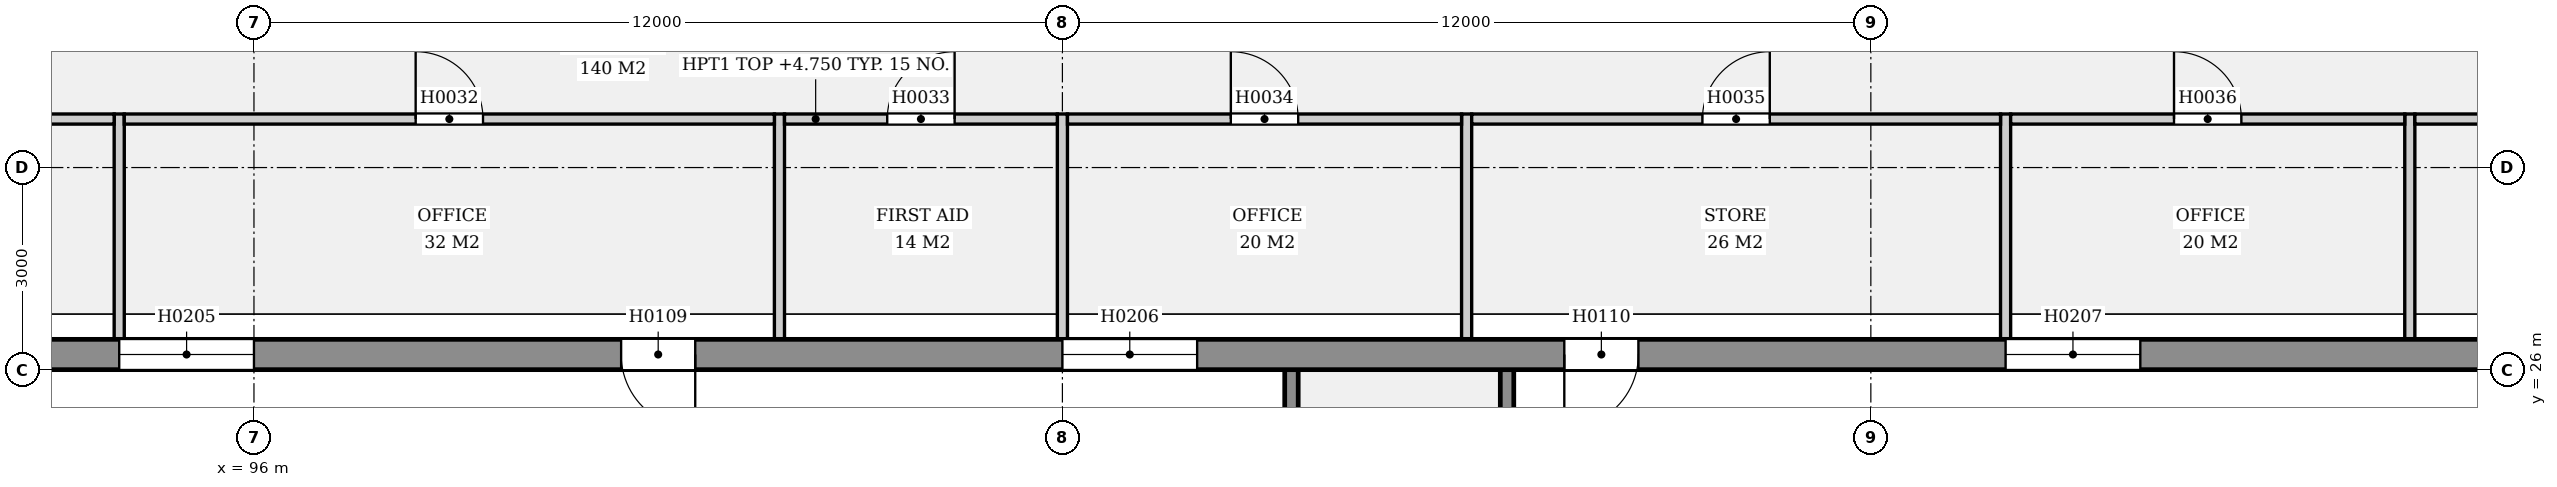
"""IFC4 building model, lengths in metres.
Left out: names, types, materials, properties, quantities, classifications, styles, units other than length and angle.
Written with IfcOpenShell. Run it as: python <this file> out.ifc"""

import sys

from ifc_helpers import new_model, si_unit, direction, frame, frame_2d, origin, place, context, subcontext, project, spatial, rectangle, extrude, element, fill, save


model = new_model("IFC4")
c1 = context("Model", 3, precision=1e-05, world=origin(), true_north=direction((0.0, 1.0)))
c2 = subcontext(c1, "Body", "Model", "MODEL_VIEW")
j1 = project(units=[si_unit("LENGTHUNIT", "METRE"), si_unit("PLANEANGLEUNIT", "RADIAN")], contexts=[c1])
p1 = place(None, origin())
s1 = spatial("IfcSite", under=j1, at=p1, CompositionType="ELEMENT")
p2 = place(p1, origin())
s2 = spatial("IfcBuilding", under=s1, at=p2, CompositionType="ELEMENT")
p3 = place(p2, origin())
s3 = spatial("IfcBuildingStorey", under=s2, at=p3, CompositionType="ELEMENT", Elevation=0.0)
p4 = place(p3, frame((64.0, 26.225, 0.0), z_axis=(0.0, 0.0, 1.0), x_axis=(1.0, 0.0, 0.0)))
e1 = element("IfcWall", 1, at=p4, inside=s3, PredefinedType="ELEMENTEDWALL", context=c2, shape_type="SweptSolid", body=[
    extrude(rectangle(XDim=76.0, YDim=0.45, at=frame_2d((38.0, 0.0))), origin(), (0.0, 0.0, 1.0), 5.0),
])
p5 = place(p4, frame((10.55, 0.0, 0.0), z_axis=(0.0, 0.0, 1.0), x_axis=(-1.0, 0.0, 0.0)))
e2 = element("IfcOpeningElement", 2, at=p5, cuts=e1, PredefinedType="OPENING", context=c2, shape_type="SweptSolid", body=[
    extrude(rectangle(XDim=1.1, YDim=2.2, at=frame_2d((0.55, 1.1))), frame((0.0, 0.235, 0.0), z_axis=(0.0, -1.0, 0.0), x_axis=(1.0, 0.0, 0.0)), (0.0, 0.0, 1.0), 0.47),
])
p6 = place(p4, frame((24.55, 0.0, 0.0), z_axis=(0.0, 0.0, 1.0), x_axis=(-1.0, 0.0, 0.0)))
e3 = element("IfcOpeningElement", 3, at=p6, cuts=e1, PredefinedType="OPENING", context=c2, shape_type="SweptSolid", body=[
    extrude(rectangle(XDim=1.1, YDim=2.2, at=frame_2d((0.55, 1.1))), frame((0.0, 0.235, 0.0), z_axis=(0.0, -1.0, 0.0), x_axis=(1.0, 0.0, 0.0)), (0.0, 0.0, 1.0), 0.47),
])
p7 = place(p4, frame((38.55, 0.0, 0.0), z_axis=(0.0, 0.0, 1.0), x_axis=(-1.0, 0.0, 0.0)))
e4 = element("IfcOpeningElement", 4, at=p7, cuts=e1, PredefinedType="OPENING", context=c2, shape_type="SweptSolid", body=[
    extrude(rectangle(XDim=1.1, YDim=2.2, at=frame_2d((0.55, 1.1))), frame((0.0, 0.235, 0.0), z_axis=(0.0, -1.0, 0.0), x_axis=(1.0, 0.0, 0.0)), (0.0, 0.0, 1.0), 0.47),
])
p8 = place(p4, frame((52.55, 0.0, 0.0), z_axis=(0.0, 0.0, 1.0), x_axis=(-1.0, 0.0, 0.0)))
e5 = element("IfcOpeningElement", 5, at=p8, cuts=e1, PredefinedType="OPENING", context=c2, shape_type="SweptSolid", body=[
    extrude(rectangle(XDim=1.1, YDim=2.2, at=frame_2d((0.55, 1.1))), frame((0.0, 0.235, 0.0), z_axis=(0.0, -1.0, 0.0), x_axis=(1.0, 0.0, 0.0)), (0.0, 0.0, 1.0), 0.47),
])
p9 = place(p4, frame((66.55, 0.0, 0.0), z_axis=(0.0, 0.0, 1.0), x_axis=(-1.0, 0.0, 0.0)))
e6 = element("IfcOpeningElement", 6, at=p9, cuts=e1, PredefinedType="OPENING", context=c2, shape_type="SweptSolid", body=[
    extrude(rectangle(XDim=1.1, YDim=2.2, at=frame_2d((0.55, 1.1))), frame((0.0, 0.235, 0.0), z_axis=(0.0, -1.0, 0.0), x_axis=(1.0, 0.0, 0.0)), (0.0, 0.0, 1.0), 0.47),
])
p10 = place(p4, frame((16.0, 0.0, 3.2)))
e7 = element("IfcOpeningElement", 7, at=p10, cuts=e1, PredefinedType="OPENING", context=c2, shape_type="SweptSolid", body=[
    extrude(rectangle(XDim=2.0, YDim=1.0, at=frame_2d((1.0, 0.5))), frame((0.0, 0.235, 0.0), z_axis=(0.0, -1.0, 0.0), x_axis=(1.0, 0.0, 0.0)), (0.0, 0.0, 1.0), 0.47),
])
p11 = place(p4, frame((30.0, 0.0, 3.2)))
e8 = element("IfcOpeningElement", 8, at=p11, cuts=e1, PredefinedType="OPENING", context=c2, shape_type="SweptSolid", body=[
    extrude(rectangle(XDim=2.0, YDim=1.0, at=frame_2d((1.0, 0.5))), frame((0.0, 0.235, 0.0), z_axis=(0.0, -1.0, 0.0), x_axis=(1.0, 0.0, 0.0)), (0.0, 0.0, 1.0), 0.47),
])
p12 = place(p4, frame((44.0, 0.0, 3.2)))
e9 = element("IfcOpeningElement", 9, at=p12, cuts=e1, PredefinedType="OPENING", context=c2, shape_type="SweptSolid", body=[
    extrude(rectangle(XDim=2.0, YDim=1.0, at=frame_2d((1.0, 0.5))), frame((0.0, 0.235, 0.0), z_axis=(0.0, -1.0, 0.0), x_axis=(1.0, 0.0, 0.0)), (0.0, 0.0, 1.0), 0.47),
])
p13 = place(p4, frame((58.0, 0.0, 3.2)))
e10 = element("IfcOpeningElement", 10, at=p13, cuts=e1, PredefinedType="OPENING", context=c2, shape_type="SweptSolid", body=[
    extrude(rectangle(XDim=2.0, YDim=1.0, at=frame_2d((1.0, 0.5))), frame((0.0, 0.235, 0.0), z_axis=(0.0, -1.0, 0.0), x_axis=(1.0, 0.0, 0.0)), (0.0, 0.0, 1.0), 0.47),
])
p14 = place(p3, frame((111.4, 19.15, 0.0), z_axis=(0.0, 0.0, 1.0), x_axis=(0.0, 1.0, 0.0)))
e11 = element("IfcWall", 11, at=p14, inside=s3, PredefinedType="ELEMENTEDWALL", context=c2, shape_type="SweptSolid", body=[
    extrude(rectangle(XDim=6.85, YDim=0.2, at=frame_2d((3.425, 0.0))), origin(), (0.0, 0.0, 1.0), 3.2),
])
p15 = place(p14, frame((0.913, 0.0, 0.9)))
e12 = element("IfcOpeningElement", 12, at=p15, cuts=e11, PredefinedType="OPENING", context=c2, shape_type="SweptSolid", body=[
    extrude(rectangle(XDim=1.6, YDim=1.6, at=frame_2d((0.8, 0.8))), frame((0.0, 0.11, 0.0), z_axis=(0.0, -1.0, 0.0), x_axis=(1.0, 0.0, 0.0)), (0.0, 0.0, 1.0), 0.22),
])
p16 = place(p14, frame((4.337, 0.0, 0.9)))
e13 = element("IfcOpeningElement", 13, at=p16, cuts=e11, PredefinedType="OPENING", context=c2, shape_type="SweptSolid", body=[
    extrude(rectangle(XDim=1.6, YDim=1.6, at=frame_2d((0.8, 0.8))), frame((0.0, 0.11, 0.0), z_axis=(0.0, -1.0, 0.0), x_axis=(1.0, 0.0, 0.0)), (0.0, 0.0, 1.0), 0.22),
])
p17 = place(p3, frame((114.6, 19.15, 0.0), z_axis=(0.0, 0.0, 1.0), x_axis=(0.0, 1.0, 0.0)))
e14 = element("IfcWall", 14, at=p17, inside=s3, PredefinedType="ELEMENTEDWALL", context=c2, shape_type="SweptSolid", body=[
    extrude(rectangle(XDim=6.85, YDim=0.2, at=frame_2d((3.425, 0.0))), origin(), (0.0, 0.0, 1.0), 3.2),
])
p18 = place(p17, frame((0.913, 0.0, 0.9)))
e15 = element("IfcOpeningElement", 15, at=p18, cuts=e14, PredefinedType="OPENING", context=c2, shape_type="SweptSolid", body=[
    extrude(rectangle(XDim=1.6, YDim=1.6, at=frame_2d((0.8, 0.8))), frame((0.0, 0.11, 0.0), z_axis=(0.0, -1.0, 0.0), x_axis=(1.0, 0.0, 0.0)), (0.0, 0.0, 1.0), 0.22),
])
p19 = place(p17, frame((4.337, 0.0, 0.9)))
e16 = element("IfcOpeningElement", 16, at=p19, cuts=e14, PredefinedType="OPENING", context=c2, shape_type="SweptSolid", body=[
    extrude(rectangle(XDim=1.6, YDim=1.6, at=frame_2d((0.8, 0.8))), frame((0.0, 0.11, 0.0), z_axis=(0.0, -1.0, 0.0), x_axis=(1.0, 0.0, 0.0)), (0.0, 0.0, 1.0), 0.22),
])
p20 = place(p3, frame((84.075, 29.72, 0.0), z_axis=(0.0, 0.0, 1.0), x_axis=(1.0, 0.0, 0.0)))
e17 = element("IfcWall", 17, at=p20, inside=s3, PredefinedType="PARTITIONING", context=c2, shape_type="SweptSolid", body=[
    extrude(rectangle(XDim=9.85, YDim=0.15, at=frame_2d((4.925, 0.0))), origin(), (0.0, 0.0, 1.0), 4.75),
])
p21 = place(p20, frame((4.375, 0.0, 0.0)))
e18 = element("IfcOpeningElement", 18, at=p21, cuts=e17, PredefinedType="OPENING", context=c2, shape_type="SweptSolid", body=[
    extrude(rectangle(XDim=1.1, YDim=2.1, at=frame_2d((0.55, 1.05))), frame((0.0, 0.085, 0.0), z_axis=(0.0, -1.0, 0.0), x_axis=(1.0, 0.0, 0.0)), (0.0, 0.0, 1.0), 0.17),
])
p22 = place(p3, frame((94.0, 26.45, 0.0), z_axis=(0.0, 0.0, 1.0), x_axis=(0.0, 1.0, 0.0)))
e19 = element("IfcWall", 19, at=p22, inside=s3, PredefinedType="PARTITIONING", context=c2, shape_type="SweptSolid", body=[
    extrude(rectangle(XDim=3.345, YDim=0.15, at=frame_2d((1.672, 0.0))), origin(), (0.0, 0.0, 1.0), 4.75),
])
p23 = place(p3, frame((94.075, 29.72, 0.0), z_axis=(0.0, 0.0, 1.0), x_axis=(1.0, 0.0, 0.0)))
e20 = element("IfcWall", 20, at=p23, inside=s3, PredefinedType="PARTITIONING", context=c2, shape_type="SweptSolid", body=[
    extrude(rectangle(XDim=9.65, YDim=0.15, at=frame_2d((4.825, 0.0))), origin(), (0.0, 0.0, 1.0), 4.75),
])
p24 = place(p23, frame((4.325, 0.0, 0.0)))
e21 = element("IfcOpeningElement", 21, at=p24, cuts=e20, PredefinedType="OPENING", context=c2, shape_type="SweptSolid", body=[
    extrude(rectangle(XDim=1.0, YDim=2.1, at=frame_2d((0.5, 1.05))), frame((0.0, 0.085, 0.0), z_axis=(0.0, -1.0, 0.0), x_axis=(1.0, 0.0, 0.0)), (0.0, 0.0, 1.0), 0.17),
])
p25 = place(p3, frame((103.8, 26.45, 0.0), z_axis=(0.0, 0.0, 1.0), x_axis=(0.0, 1.0, 0.0)))
e22 = element("IfcWall", 22, at=p25, inside=s3, PredefinedType="PARTITIONING", context=c2, shape_type="SweptSolid", body=[
    extrude(rectangle(XDim=3.345, YDim=0.15, at=frame_2d((1.672, 0.0))), origin(), (0.0, 0.0, 1.0), 4.75),
])
p26 = place(p3, frame((103.875, 29.72, 0.0), z_axis=(0.0, 0.0, 1.0), x_axis=(1.0, 0.0, 0.0)))
e23 = element("IfcWall", 23, at=p26, inside=s3, PredefinedType="PARTITIONING", context=c2, shape_type="SweptSolid", body=[
    extrude(rectangle(XDim=4.05, YDim=0.15, at=frame_2d((2.025, 0.0))), origin(), (0.0, 0.0, 1.0), 4.75),
])
p27 = place(p26, frame((1.525, 0.0, 0.0)))
e24 = element("IfcOpeningElement", 24, at=p27, cuts=e23, PredefinedType="OPENING", context=c2, shape_type="SweptSolid", body=[
    extrude(rectangle(XDim=1.0, YDim=2.1, at=frame_2d((0.5, 1.05))), frame((0.0, 0.085, 0.0), z_axis=(0.0, -1.0, 0.0), x_axis=(1.0, 0.0, 0.0)), (0.0, 0.0, 1.0), 0.17),
])
p28 = place(p3, frame((108.0, 26.45, 0.0), z_axis=(0.0, 0.0, 1.0), x_axis=(0.0, 1.0, 0.0)))
e25 = element("IfcWall", 25, at=p28, inside=s3, PredefinedType="PARTITIONING", context=c2, shape_type="SweptSolid", body=[
    extrude(rectangle(XDim=3.345, YDim=0.15, at=frame_2d((1.672, 0.0))), origin(), (0.0, 0.0, 1.0), 4.75),
])
p29 = place(p3, frame((108.075, 29.72, 0.0), z_axis=(0.0, 0.0, 1.0), x_axis=(1.0, 0.0, 0.0)))
e26 = element("IfcWall", 26, at=p29, inside=s3, PredefinedType="PARTITIONING", context=c2, shape_type="SweptSolid", body=[
    extrude(rectangle(XDim=5.85, YDim=0.15, at=frame_2d((2.925, 0.0))), origin(), (0.0, 0.0, 1.0), 4.75),
])
p30 = place(p29, frame((2.425, 0.0, 0.0)))
e27 = element("IfcOpeningElement", 27, at=p30, cuts=e26, PredefinedType="OPENING", context=c2, shape_type="SweptSolid", body=[
    extrude(rectangle(XDim=1.0, YDim=2.1, at=frame_2d((0.5, 1.05))), frame((0.0, 0.085, 0.0), z_axis=(0.0, -1.0, 0.0), x_axis=(1.0, 0.0, 0.0)), (0.0, 0.0, 1.0), 0.17),
])
p31 = place(p3, frame((114.0, 26.45, 0.0), z_axis=(0.0, 0.0, 1.0), x_axis=(0.0, 1.0, 0.0)))
e28 = element("IfcWall", 28, at=p31, inside=s3, PredefinedType="PARTITIONING", context=c2, shape_type="SweptSolid", body=[
    extrude(rectangle(XDim=3.345, YDim=0.15, at=frame_2d((1.672, 0.0))), origin(), (0.0, 0.0, 1.0), 4.75),
])
p32 = place(p3, frame((114.075, 29.72, 0.0), z_axis=(0.0, 0.0, 1.0), x_axis=(1.0, 0.0, 0.0)))
e29 = element("IfcWall", 29, at=p32, inside=s3, PredefinedType="PARTITIONING", context=c2, shape_type="SweptSolid", body=[
    extrude(rectangle(XDim=7.85, YDim=0.15, at=frame_2d((3.925, 0.0))), origin(), (0.0, 0.0, 1.0), 4.75),
])
p33 = place(p32, frame((3.425, 0.0, 0.0)))
e30 = element("IfcOpeningElement", 30, at=p33, cuts=e29, PredefinedType="OPENING", context=c2, shape_type="SweptSolid", body=[
    extrude(rectangle(XDim=1.0, YDim=2.1, at=frame_2d((0.5, 1.05))), frame((0.0, 0.085, 0.0), z_axis=(0.0, -1.0, 0.0), x_axis=(1.0, 0.0, 0.0)), (0.0, 0.0, 1.0), 0.17),
])
p34 = place(p3, frame((122.0, 26.45, 0.0), z_axis=(0.0, 0.0, 1.0), x_axis=(0.0, 1.0, 0.0)))
e31 = element("IfcWall", 31, at=p34, inside=s3, PredefinedType="PARTITIONING", context=c2, shape_type="SweptSolid", body=[
    extrude(rectangle(XDim=3.345, YDim=0.15, at=frame_2d((1.672, 0.0))), origin(), (0.0, 0.0, 1.0), 4.75),
])
p35 = place(p3, frame((122.075, 29.72, 0.0), z_axis=(0.0, 0.0, 1.0), x_axis=(1.0, 0.0, 0.0)))
e32 = element("IfcWall", 32, at=p35, inside=s3, PredefinedType="PARTITIONING", context=c2, shape_type="SweptSolid", body=[
    extrude(rectangle(XDim=5.85, YDim=0.15, at=frame_2d((2.925, 0.0))), origin(), (0.0, 0.0, 1.0), 4.75),
])
p36 = place(p35, frame((2.425, 0.0, 0.0)))
e33 = element("IfcOpeningElement", 33, at=p36, cuts=e32, PredefinedType="OPENING", context=c2, shape_type="SweptSolid", body=[
    extrude(rectangle(XDim=1.0, YDim=2.1, at=frame_2d((0.5, 1.05))), frame((0.0, 0.085, 0.0), z_axis=(0.0, -1.0, 0.0), x_axis=(1.0, 0.0, 0.0)), (0.0, 0.0, 1.0), 0.17),
])
p37 = place(p3, frame((128.0, 26.45, 0.0), z_axis=(0.0, 0.0, 1.0), x_axis=(0.0, 1.0, 0.0)))
e34 = element("IfcWall", 34, at=p37, inside=s3, PredefinedType="PARTITIONING", context=c2, shape_type="SweptSolid", body=[
    extrude(rectangle(XDim=3.345, YDim=0.15, at=frame_2d((1.672, 0.0))), origin(), (0.0, 0.0, 1.0), 4.75),
])
p38 = place(p3, frame((128.075, 29.72, 0.0), z_axis=(0.0, 0.0, 1.0), x_axis=(1.0, 0.0, 0.0)))
e35 = element("IfcWall", 35, at=p38, inside=s3, PredefinedType="PARTITIONING", context=c2, shape_type="SweptSolid", body=[
    extrude(rectangle(XDim=11.925, YDim=0.15, at=frame_2d((5.962, 0.0))), origin(), (0.0, 0.0, 1.0), 4.75),
])
p39 = place(p38, frame((5.425, 0.0, 0.0)))
e36 = element("IfcOpeningElement", 36, at=p39, cuts=e35, PredefinedType="OPENING", context=c2, shape_type="SweptSolid", body=[
    extrude(rectangle(XDim=1.0, YDim=2.1, at=frame_2d((0.5, 1.05))), frame((0.0, 0.085, 0.0), z_axis=(0.0, -1.0, 0.0), x_axis=(1.0, 0.0, 0.0)), (0.0, 0.0, 1.0), 0.17),
])
p40 = place(p7, origin())
e37 = element("IfcDoor", 37, at=p40, inside=s3, OperationType="SINGLE_SWING_RIGHT", PredefinedType="DOOR", context=c2, shape_type="SweptSolid", body=[
    extrude(rectangle(XDim=1.1, YDim=2.2, at=frame_2d((0.55, 1.1))), frame((0.0, 0.025, 0.0), z_axis=(0.0, -1.0, 0.0), x_axis=(1.0, 0.0, 0.0)), (0.0, 0.0, 1.0), 0.05),
])
fill(e4, e37)
p41 = place(p8, origin())
e38 = element("IfcDoor", 38, at=p41, inside=s3, OperationType="SINGLE_SWING_LEFT", PredefinedType="DOOR", context=c2, shape_type="SweptSolid", body=[
    extrude(rectangle(XDim=1.1, YDim=2.2, at=frame_2d((0.55, 1.1))), frame((0.0, 0.025, 0.0), z_axis=(0.0, -1.0, 0.0), x_axis=(1.0, 0.0, 0.0)), (0.0, 0.0, 1.0), 0.05),
])
fill(e5, e38)
p42 = place(p11, origin())
e39 = element("IfcWindow", 39, at=p42, inside=s3, PartitioningType="SINGLE_PANEL", PredefinedType="WINDOW", context=c2, shape_type="SweptSolid", body=[
    extrude(rectangle(XDim=2.0, YDim=1.0, at=frame_2d((1.0, 0.5))), frame((0.0, 0.03, 0.0), z_axis=(0.0, -1.0, 0.0), x_axis=(1.0, 0.0, 0.0)), (0.0, 0.0, 1.0), 0.06),
])
fill(e8, e39)
p43 = place(p12, origin())
e40 = element("IfcWindow", 40, at=p43, inside=s3, PartitioningType="SINGLE_PANEL", PredefinedType="WINDOW", context=c2, shape_type="SweptSolid", body=[
    extrude(rectangle(XDim=2.0, YDim=1.0, at=frame_2d((1.0, 0.5))), frame((0.0, 0.03, 0.0), z_axis=(0.0, -1.0, 0.0), x_axis=(1.0, 0.0, 0.0)), (0.0, 0.0, 1.0), 0.06),
])
fill(e9, e40)
p44 = place(p13, origin())
e41 = element("IfcWindow", 41, at=p44, inside=s3, PartitioningType="SINGLE_PANEL", PredefinedType="WINDOW", context=c2, shape_type="SweptSolid", body=[
    extrude(rectangle(XDim=2.0, YDim=1.0, at=frame_2d((1.0, 0.5))), frame((0.0, 0.03, 0.0), z_axis=(0.0, -1.0, 0.0), x_axis=(1.0, 0.0, 0.0)), (0.0, 0.0, 1.0), 0.06),
])
fill(e10, e41)
p45 = place(p24, origin())
e42 = element("IfcDoor", 42, at=p45, inside=s3, OperationType="SINGLE_SWING_LEFT", PredefinedType="DOOR", context=c2, shape_type="SweptSolid", body=[
    extrude(rectangle(XDim=1.0, YDim=2.1, at=frame_2d((0.5, 1.05))), frame((0.0, 0.025, 0.0), z_axis=(0.0, -1.0, 0.0), x_axis=(1.0, 0.0, 0.0)), (0.0, 0.0, 1.0), 0.05),
])
fill(e21, e42)
p46 = place(p27, origin())
e43 = element("IfcDoor", 43, at=p46, inside=s3, OperationType="SINGLE_SWING_RIGHT", PredefinedType="DOOR", context=c2, shape_type="SweptSolid", body=[
    extrude(rectangle(XDim=1.0, YDim=2.1, at=frame_2d((0.5, 1.05))), frame((0.0, 0.025, 0.0), z_axis=(0.0, -1.0, 0.0), x_axis=(1.0, 0.0, 0.0)), (0.0, 0.0, 1.0), 0.05),
])
fill(e24, e43)
p47 = place(p30, origin())
e44 = element("IfcDoor", 44, at=p47, inside=s3, OperationType="SINGLE_SWING_LEFT", PredefinedType="DOOR", context=c2, shape_type="SweptSolid", body=[
    extrude(rectangle(XDim=1.0, YDim=2.1, at=frame_2d((0.5, 1.05))), frame((0.0, 0.025, 0.0), z_axis=(0.0, -1.0, 0.0), x_axis=(1.0, 0.0, 0.0)), (0.0, 0.0, 1.0), 0.05),
])
fill(e27, e44)
p48 = place(p33, origin())
e45 = element("IfcDoor", 45, at=p48, inside=s3, OperationType="SINGLE_SWING_RIGHT", PredefinedType="DOOR", context=c2, shape_type="SweptSolid", body=[
    extrude(rectangle(XDim=1.0, YDim=2.1, at=frame_2d((0.5, 1.05))), frame((0.0, 0.025, 0.0), z_axis=(0.0, -1.0, 0.0), x_axis=(1.0, 0.0, 0.0)), (0.0, 0.0, 1.0), 0.05),
])
fill(e30, e45)
p49 = place(p36, origin())
e46 = element("IfcDoor", 46, at=p49, inside=s3, OperationType="SINGLE_SWING_LEFT", PredefinedType="DOOR", context=c2, shape_type="SweptSolid", body=[
    extrude(rectangle(XDim=1.0, YDim=2.1, at=frame_2d((0.5, 1.05))), frame((0.0, 0.025, 0.0), z_axis=(0.0, -1.0, 0.0), x_axis=(1.0, 0.0, 0.0)), (0.0, 0.0, 1.0), 0.05),
])
fill(e33, e46)
save(model, sys.argv[1])
